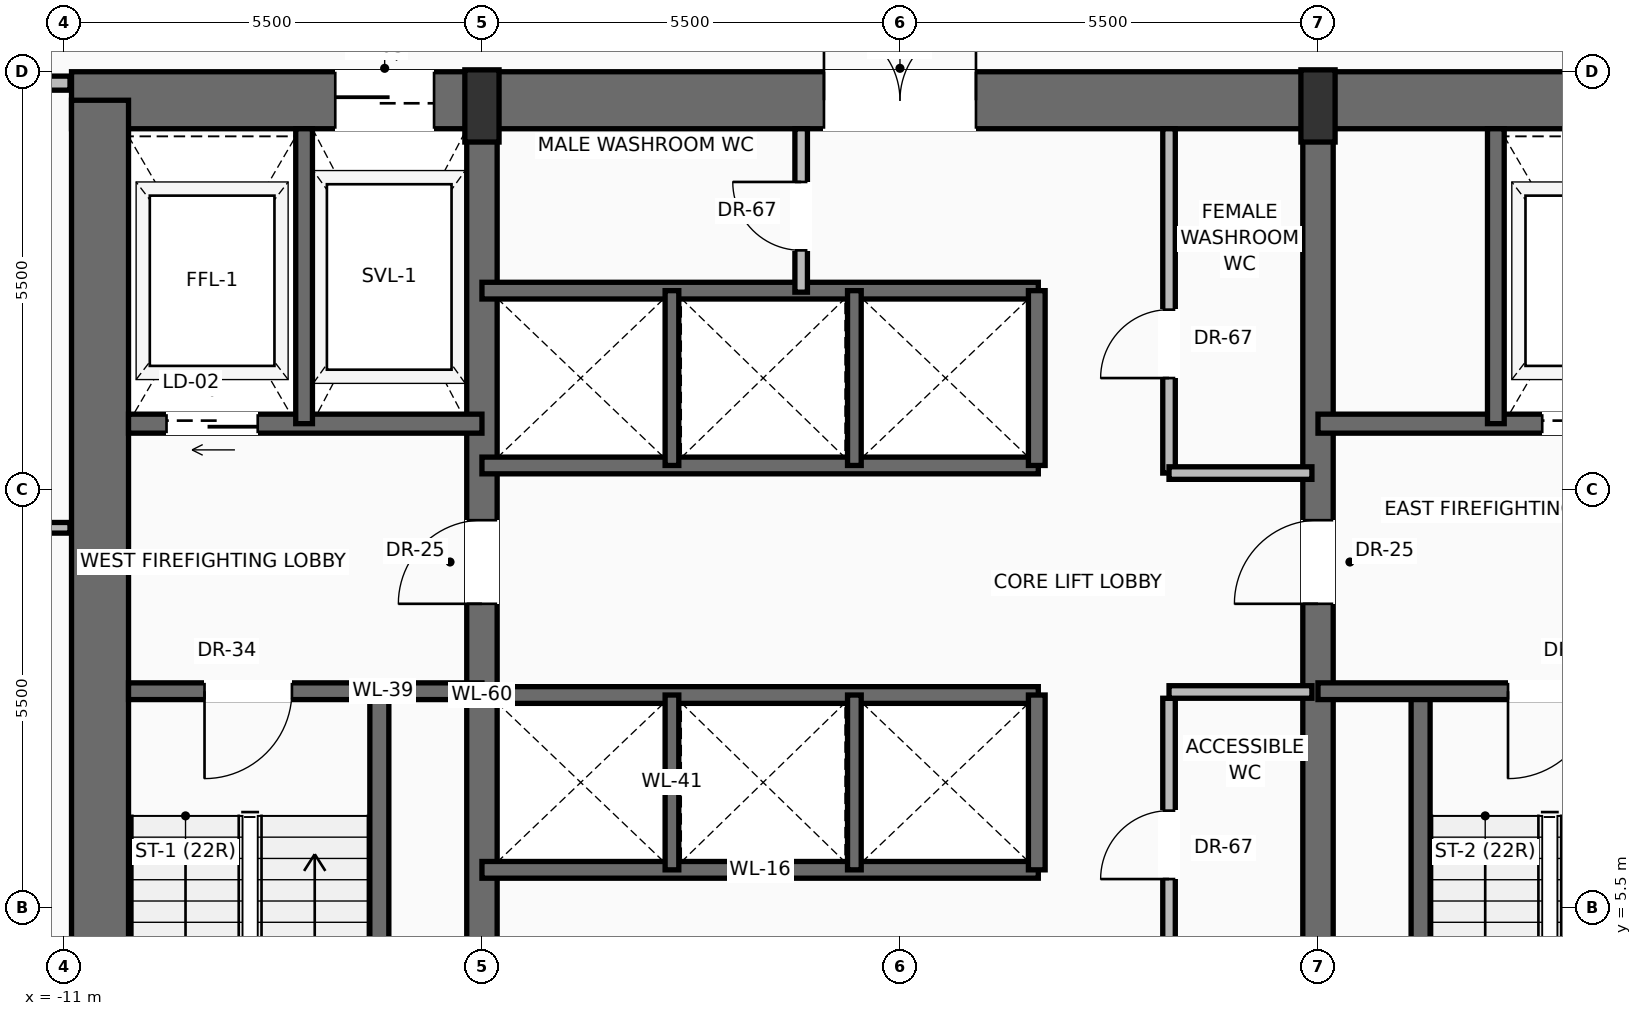
"""IFC4 building model, lengths in metres.
Left out: names, types, materials, properties, quantities, classifications, styles, units other than length and angle.
Written with IfcOpenShell. Run it as: python <this file> out.ifc"""

import sys

from ifc_helpers import new_model, si_unit, direction, frame, frame_2d, origin, origin_2d, place, context, subcontext, project, spatial, rectangle, extrude, source, transform, mapped, element, fill, save


model = new_model("IFC4")
c1 = context("Model", 3, precision=1e-05, world=origin(), true_north=direction((0.0, 1.0)))
c2 = subcontext(c1, "Body", "Model", "MODEL_VIEW")
j1 = project(units=[si_unit("LENGTHUNIT", "METRE"), si_unit("PLANEANGLEUNIT", "RADIAN")], contexts=[c1])
p1 = place(None, origin())
s1 = spatial("IfcSite", under=j1, at=p1, CompositionType="ELEMENT")
p2 = place(p1, origin())
s2 = spatial("IfcBuilding", under=s1, at=p2, CompositionType="ELEMENT")
p3 = place(p2, frame((0.0, 0.0, 87.7)))
s3 = spatial("IfcBuildingStorey", under=s2, at=p3, CompositionType="ELEMENT", Elevation=87.7)
p4 = place(p3, frame((-10.9, 16.125, 0.0), z_axis=(0.0, 0.0, 1.0), x_axis=(1.0, 0.0, 0.0)))
e1 = element("IfcWall", 1, at=p4, inside=s3, PredefinedType="SHEAR", context=c2, shape_type="SweptSolid", body=[
    extrude(rectangle(XDim=21.8, YDim=0.75, at=frame_2d((10.9, 0.0))), origin(), (0.0, 0.0, 1.0), 3.45),
])
p5 = place(p4, frame((3.47, 0.0, 0.0)))
e2 = element("IfcOpeningElement", 2, at=p5, cuts=e1, PredefinedType="OPENING", context=c2, shape_type="SweptSolid", body=[
    extrude(rectangle(XDim=1.3, YDim=2.3, at=frame_2d((0.65, 1.15))), frame((0.0, 0.385, 0.0), z_axis=(0.0, -1.0, 0.0), x_axis=(1.0, 0.0, 0.0)), (0.0, 0.0, 1.0), 0.77),
])
p6 = place(p4, frame((9.9, 0.0, 0.0)))
e3 = element("IfcOpeningElement", 3, at=p6, cuts=e1, PredefinedType="OPENING", context=c2, shape_type="SweptSolid", body=[
    extrude(rectangle(XDim=2.0, YDim=2.4, at=frame_2d((1.0, 1.2))), frame((0.0, 0.385, 0.0), z_axis=(0.0, -1.0, 0.0), x_axis=(1.0, 0.0, 0.0)), (0.0, 0.0, 1.0), 0.77),
])
p7 = place(p3, frame((-10.525, 0.475, 0.0), z_axis=(0.0, 0.0, 1.0), x_axis=(0.0, 1.0, 0.0)))
e4 = element("IfcWall", 4, at=p7, inside=s3, PredefinedType="SHEAR", context=c2, shape_type="SweptSolid", body=[
    extrude(rectangle(XDim=15.65, YDim=0.75, at=frame_2d((7.825, 0.0))), origin(), (0.0, 0.0, 1.0), 3.45),
])
p8 = place(p3, frame((-5.5, 0.475, 0.0), z_axis=(0.0, 0.0, 1.0), x_axis=(0.0, 1.0, 0.0)))
e5 = element("IfcWall", 5, at=p8, inside=s3, PredefinedType="SHEAR", context=c2, shape_type="SweptSolid", body=[
    extrude(rectangle(XDim=15.65, YDim=0.4, at=frame_2d((7.825, 0.0))), origin(), (0.0, 0.0, 1.0), 3.45),
])
p9 = place(p8, frame((9.025, 0.0, 0.0)))
e6 = element("IfcOpeningElement", 6, at=p9, cuts=e5, PredefinedType="OPENING", context=c2, shape_type="SweptSolid", body=[
    extrude(rectangle(XDim=1.1, YDim=2.2, at=frame_2d((0.55, 1.1))), frame((0.0, 0.21, 0.0), z_axis=(0.0, -1.0, 0.0), x_axis=(1.0, 0.0, 0.0)), (0.0, 0.0, 1.0), 0.42),
])
p10 = place(p3, frame((5.5, 0.475, 0.0), z_axis=(0.0, 0.0, 1.0), x_axis=(0.0, 1.0, 0.0)))
e7 = element("IfcWall", 7, at=p10, inside=s3, PredefinedType="SHEAR", context=c2, shape_type="SweptSolid", body=[
    extrude(rectangle(XDim=15.65, YDim=0.4, at=frame_2d((7.825, 0.0))), origin(), (0.0, 0.0, 1.0), 3.45),
])
p11 = place(p10, frame((9.025, 0.0, 0.0)))
e8 = element("IfcOpeningElement", 8, at=p11, cuts=e7, PredefinedType="OPENING", context=c2, shape_type="SweptSolid", body=[
    extrude(rectangle(XDim=1.1, YDim=2.2, at=frame_2d((0.55, 1.1))), frame((0.0, 0.21, 0.0), z_axis=(0.0, -1.0, 0.0), x_axis=(1.0, 0.0, 0.0)), (0.0, 0.0, 1.0), 0.42),
])
m1 = source(origin(), c2, "Body", "SweptSolid", [
    extrude(rectangle(XDim=0.45, YDim=0.95, at=origin_2d()), origin(), (0.0, 0.0, 1.0), 3.7),
])
for number, where, z_axis, x_axis in (
    (9, (-5.5, 16.05, 0.0), (0.0, 0.0, 1.0), (1.0, 0.0, 0.0)),
    (10, (5.5, 16.05, 0.0), (0.0, 0.0, 1.0), (1.0, 0.0, 0.0)),
):
    element("IfcColumn", number, at=place(p3, frame(where, z_axis=z_axis, x_axis=x_axis)), inside=s3, PredefinedType="PILASTER", context=c2, shape_type="MappedRepresentation", body=[
        mapped(m1, transform((0.0, 0.0, 0.0), scale=1.0)),
    ])
p12 = place(p3, frame((-6.85, 0.85, 0.0), z_axis=(0.0, 0.0, 1.0), x_axis=(0.0, 1.0, 0.0)))
e11 = element("IfcWall", 11, at=p12, inside=s3, PredefinedType="SOLIDWALL", context=c2, shape_type="SweptSolid", body=[
    extrude(rectangle(XDim=7.5, YDim=0.25, at=frame_2d((3.75, 0.0))), origin(), (0.0, 0.0, 1.0), 3.45),
])
p13 = place(p3, frame((-5.5, 8.35, 0.0), z_axis=(0.0, 0.0, 1.0), x_axis=(-1.0, 0.0, 0.0)))
e12 = element("IfcWall", 12, at=p13, inside=s3, PredefinedType="SOLIDWALL", context=c2, shape_type="SweptSolid", body=[
    extrude(rectangle(XDim=4.65, YDim=0.22, at=frame_2d((2.325, 0.0))), origin(), (0.0, 0.0, 1.0), 3.45),
])
p14 = place(p13, frame((2.5, 0.0, 0.0)))
e13 = element("IfcOpeningElement", 13, at=p14, cuts=e12, PredefinedType="OPENING", context=c2, shape_type="SweptSolid", body=[
    extrude(rectangle(XDim=1.15, YDim=2.2, at=frame_2d((0.575, 1.1))), frame((0.0, 0.12, 0.0), z_axis=(0.0, -1.0, 0.0), x_axis=(1.0, 0.0, 0.0)), (0.0, 0.0, 1.0), 0.24),
])
p15 = place(p3, frame((-5.5, 11.87, 0.0), z_axis=(0.0, 0.0, 1.0), x_axis=(-1.0, 0.0, 0.0)))
e14 = element("IfcWall", 14, at=p15, inside=s3, PredefinedType="SOLIDWALL", context=c2, shape_type="SweptSolid", body=[
    extrude(rectangle(XDim=4.65, YDim=0.25, at=frame_2d((2.325, 0.0))), origin(), (0.0, 0.0, 1.0), 3.45),
])
p16 = place(p15, frame((2.95, 0.0, 0.0)))
e15 = element("IfcOpeningElement", 15, at=p16, cuts=e14, PredefinedType="OPENING", context=c2, shape_type="SweptSolid", body=[
    extrude(rectangle(XDim=1.2, YDim=2.25, at=frame_2d((0.6, 1.125))), frame((0.0, 0.135, 0.0), z_axis=(0.0, -1.0, 0.0), x_axis=(1.0, 0.0, 0.0)), (0.0, 0.0, 1.0), 0.27),
])
p17 = place(p3, frame((-7.84, 11.87, 0.0), z_axis=(0.0, 0.0, 1.0), x_axis=(0.0, 1.0, 0.0)))
e16 = element("IfcWall", 16, at=p17, inside=s3, PredefinedType="SOLIDWALL", context=c2, shape_type="SweptSolid", body=[
    extrude(rectangle(XDim=3.88, YDim=0.22, at=frame_2d((1.94, 0.0))), origin(), (0.0, 0.0, 1.0), 3.45),
])
p18 = place(p3, frame((6.85, 0.85, 0.0), z_axis=(0.0, 0.0, 1.0), x_axis=(0.0, 1.0, 0.0)))
e17 = element("IfcWall", 17, at=p18, inside=s3, PredefinedType="SOLIDWALL", context=c2, shape_type="SweptSolid", body=[
    extrude(rectangle(XDim=7.5, YDim=0.25, at=frame_2d((3.75, 0.0))), origin(), (0.0, 0.0, 1.0), 3.45),
])
p19 = place(p3, frame((10.15, 8.35, 0.0), z_axis=(0.0, 0.0, 1.0), x_axis=(-1.0, 0.0, 0.0)))
e18 = element("IfcWall", 18, at=p19, inside=s3, PredefinedType="SOLIDWALL", context=c2, shape_type="SweptSolid", body=[
    extrude(rectangle(XDim=4.65, YDim=0.22, at=frame_2d((2.325, 0.0))), origin(), (0.0, 0.0, 1.0), 3.45),
])
p20 = place(p19, frame((1.0, 0.0, 0.0)))
e19 = element("IfcOpeningElement", 19, at=p20, cuts=e18, PredefinedType="OPENING", context=c2, shape_type="SweptSolid", body=[
    extrude(rectangle(XDim=1.15, YDim=2.2, at=frame_2d((0.575, 1.1))), frame((0.0, 0.12, 0.0), z_axis=(0.0, -1.0, 0.0), x_axis=(1.0, 0.0, 0.0)), (0.0, 0.0, 1.0), 0.24),
])
p21 = place(p3, frame((10.15, 11.87, 0.0), z_axis=(0.0, 0.0, 1.0), x_axis=(-1.0, 0.0, 0.0)))
e20 = element("IfcWall", 20, at=p21, inside=s3, PredefinedType="SOLIDWALL", context=c2, shape_type="SweptSolid", body=[
    extrude(rectangle(XDim=4.65, YDim=0.25, at=frame_2d((2.325, 0.0))), origin(), (0.0, 0.0, 1.0), 3.45),
])
p22 = place(p21, frame((0.5, 0.0, 0.0)))
e21 = element("IfcOpeningElement", 21, at=p22, cuts=e20, PredefinedType="OPENING", context=c2, shape_type="SweptSolid", body=[
    extrude(rectangle(XDim=1.2, YDim=2.25, at=frame_2d((0.6, 1.125))), frame((0.0, 0.135, 0.0), z_axis=(0.0, -1.0, 0.0), x_axis=(1.0, 0.0, 0.0)), (0.0, 0.0, 1.0), 0.27),
])
p23 = place(p3, frame((7.84, 11.87, 0.0), z_axis=(0.0, 0.0, 1.0), x_axis=(0.0, 1.0, 0.0)))
e22 = element("IfcWall", 22, at=p23, inside=s3, PredefinedType="SOLIDWALL", context=c2, shape_type="SweptSolid", body=[
    extrude(rectangle(XDim=3.88, YDim=0.22, at=frame_2d((1.94, 0.0))), origin(), (0.0, 0.0, 1.0), 3.45),
])
p24 = place(p3, frame((3.54, 3.933, 0.0), z_axis=(0.0, 0.0, 1.0), x_axis=(0.0, 1.0, 0.0)))
e23 = element("IfcWall", 23, at=p24, inside=s3, PredefinedType="PARTITIONING", context=c2, shape_type="SweptSolid", body=[
    extrude(rectangle(XDim=4.325, YDim=0.165, at=frame_2d((2.163, 0.0))), origin(), (0.0, 0.0, 1.0), 3.442),
])
p25 = place(p24, frame((1.946, 0.0, 0.0)))
e24 = element("IfcOpeningElement", 24, at=p25, cuts=e23, PredefinedType="OPENING", context=c2, shape_type="SweptSolid", body=[
    extrude(rectangle(XDim=0.9, YDim=2.1, at=frame_2d((0.45, 1.05))), frame((0.0, 0.093, 0.0), z_axis=(0.0, -1.0, 0.0), x_axis=(1.0, 0.0, 0.0)), (0.0, 0.0, 1.0), 0.185),
])
p26 = place(p3, frame((3.54, 8.34, 0.0), z_axis=(0.0, 0.0, 1.0), x_axis=(1.0, 0.0, 0.0)))
e25 = element("IfcWall", 25, at=p26, inside=s3, PredefinedType="PARTITIONING", context=c2, shape_type="SweptSolid", body=[
    extrude(rectangle(XDim=1.88, YDim=0.165, at=frame_2d((0.94, 0.0))), origin(), (0.0, 0.0, 1.0), 3.442),
])
for number, where, z_axis, x_axis in (
    (26, (-5.5, 6.0, 0.0), (0.0, 0.0, 1.0), (1.0, 0.0, 0.0)),
    (27, (-5.5, 8.3, 0.0), (0.0, 0.0, 1.0), (1.0, 0.0, 0.0)),
):
    element("IfcWall", number, at=place(p3, frame(where, z_axis=z_axis, x_axis=x_axis)), inside=s3, PredefinedType="SOLIDWALL", context=c2, shape_type="SweptSolid", body=[
        extrude(rectangle(XDim=7.32, YDim=0.22, at=frame_2d((3.66, 0.0))), origin(), (0.0, 0.0, 1.0), 3.45),
    ])
p27 = place(p3, frame((1.8, 6.0, 0.0), z_axis=(0.0, 0.0, 1.0), x_axis=(0.0, 1.0, 0.0)))
e28 = element("IfcWall", 28, at=p27, inside=s3, PredefinedType="SOLIDWALL", context=c2, shape_type="SweptSolid", body=[
    extrude(rectangle(XDim=2.3, YDim=0.22, at=frame_2d((1.15, 0.0))), origin(), (0.0, 0.0, 1.0), 3.45),
])
for number, where, z_axis, x_axis in (
    (29, (-3.0, 6.0, 0.0), (0.0, 0.0, 1.0), (0.0, 1.0, 0.0)),
    (30, (-0.6, 6.0, 0.0), (0.0, 0.0, 1.0), (0.0, 1.0, 0.0)),
):
    element("IfcWall", number, at=place(p3, frame(where, z_axis=z_axis, x_axis=x_axis)), inside=s3, PredefinedType="SOLIDWALL", context=c2, shape_type="SweptSolid", body=[
        extrude(rectangle(XDim=2.3, YDim=0.18, at=frame_2d((1.15, 0.0))), origin(), (0.0, 0.0, 1.0), 3.45),
    ])
for number, where, z_axis, x_axis in (
    (31, (-5.5, 11.32, 0.0), (0.0, 0.0, 1.0), (1.0, 0.0, 0.0)),
    (32, (-5.5, 13.62, 0.0), (0.0, 0.0, 1.0), (1.0, 0.0, 0.0)),
):
    element("IfcWall", number, at=place(p3, frame(where, z_axis=z_axis, x_axis=x_axis)), inside=s3, PredefinedType="SOLIDWALL", context=c2, shape_type="SweptSolid", body=[
        extrude(rectangle(XDim=7.32, YDim=0.22, at=frame_2d((3.66, 0.0))), origin(), (0.0, 0.0, 1.0), 3.45),
    ])
p28 = place(p3, frame((1.8, 11.32, 0.0), z_axis=(0.0, 0.0, 1.0), x_axis=(0.0, 1.0, 0.0)))
e33 = element("IfcWall", 33, at=p28, inside=s3, PredefinedType="SOLIDWALL", context=c2, shape_type="SweptSolid", body=[
    extrude(rectangle(XDim=2.3, YDim=0.22, at=frame_2d((1.15, 0.0))), origin(), (0.0, 0.0, 1.0), 3.45),
])
for number, where, z_axis, x_axis in (
    (34, (-3.0, 11.32, 0.0), (0.0, 0.0, 1.0), (0.0, 1.0, 0.0)),
    (35, (-0.6, 11.32, 0.0), (0.0, 0.0, 1.0), (0.0, 1.0, 0.0)),
):
    element("IfcWall", number, at=place(p3, frame(where, z_axis=z_axis, x_axis=x_axis)), inside=s3, PredefinedType="SOLIDWALL", context=c2, shape_type="SweptSolid", body=[
        extrude(rectangle(XDim=2.3, YDim=0.18, at=frame_2d((1.15, 0.0))), origin(), (0.0, 0.0, 1.0), 3.45),
    ])
p29 = place(p3, frame((-1.3, 13.6, 0.0), z_axis=(0.0, 0.0, 1.0), x_axis=(0.0, 1.0, 0.0)))
e36 = element("IfcWall", 36, at=p29, inside=s3, PredefinedType="PARTITIONING", context=c2, shape_type="SweptSolid", body=[
    extrude(rectangle(XDim=2.15, YDim=0.165, at=frame_2d((1.075, 0.0))), origin(), (0.0, 0.0, 1.0), 3.442),
])
p30 = place(p29, frame((0.55, 0.0, 0.0)))
e37 = element("IfcOpeningElement", 37, at=p30, cuts=e36, PredefinedType="OPENING", context=c2, shape_type="SweptSolid", body=[
    extrude(rectangle(XDim=0.9, YDim=2.1, at=frame_2d((0.45, 1.05))), frame((0.0, 0.093, 0.0), z_axis=(0.0, -1.0, 0.0), x_axis=(1.0, 0.0, 0.0)), (0.0, 0.0, 1.0), 0.185),
])
p31 = place(p3, frame((3.54, 11.22, 0.0), z_axis=(0.0, 0.0, 1.0), x_axis=(0.0, 1.0, 0.0)))
e38 = element("IfcWall", 38, at=p31, inside=s3, PredefinedType="PARTITIONING", context=c2, shape_type="SweptSolid", body=[
    extrude(rectangle(XDim=4.53, YDim=0.165, at=frame_2d((2.265, 0.0))), origin(), (0.0, 0.0, 1.0), 3.442),
])
p32 = place(p31, frame((1.25, 0.0, 0.0)))
e39 = element("IfcOpeningElement", 39, at=p32, cuts=e38, PredefinedType="OPENING", context=c2, shape_type="SweptSolid", body=[
    extrude(rectangle(XDim=0.9, YDim=2.1, at=frame_2d((0.45, 1.05))), frame((0.0, 0.093, 0.0), z_axis=(0.0, -1.0, 0.0), x_axis=(1.0, 0.0, 0.0)), (0.0, 0.0, 1.0), 0.185),
])
p33 = place(p3, frame((3.54, 11.22, 0.0), z_axis=(0.0, 0.0, 1.0), x_axis=(1.0, 0.0, 0.0)))
e40 = element("IfcWall", 40, at=p33, inside=s3, PredefinedType="PARTITIONING", context=c2, shape_type="SweptSolid", body=[
    extrude(rectangle(XDim=1.88, YDim=0.165, at=frame_2d((0.94, 0.0))), origin(), (0.0, 0.0, 1.0), 3.442),
])
p34 = place(p3, frame((-23.229, 16.35, 0.0), z_axis=(0.0, 0.0, 1.0), x_axis=(1.0, 0.0, 0.0)))
e41 = element("IfcWall", 41, at=p34, inside=s3, PredefinedType="PARTITIONING", context=c2, shape_type="SweptSolid", body=[
    extrude(rectangle(XDim=12.31, YDim=0.185, at=frame_2d((6.155, 0.0))), origin(), (0.0, 0.0, 1.0), 2.747),
])
p35 = place(p34, frame((5.098, 0.0, 0.0)))
e42 = element("IfcOpeningElement", 42, at=p35, cuts=e41, PredefinedType="OPENING", context=c2, shape_type="SweptSolid", body=[
    extrude(rectangle(XDim=0.95, YDim=2.2, at=frame_2d((0.475, 1.1))), frame((0.0, 0.103, 0.0), z_axis=(0.0, -1.0, 0.0), x_axis=(1.0, 0.0, 0.0)), (0.0, 0.0, 1.0), 0.205),
])
p36 = place(p3, frame((-27.177, 10.5, 0.0), z_axis=(0.0, 0.0, 1.0), x_axis=(1.0, 0.0, 0.0)))
e43 = element("IfcWall", 43, at=p36, inside=s3, PredefinedType="PARTITIONING", context=c2, shape_type="SweptSolid", body=[
    extrude(rectangle(XDim=16.257, YDim=0.14, at=frame_2d((8.128, 0.0))), origin(), (0.0, 0.0, 1.0), 3.442),
])
p37 = place(p36, frame((7.666, 0.0, 0.0)))
e44 = element("IfcOpeningElement", 44, at=p37, cuts=e43, PredefinedType="OPENING", context=c2, shape_type="SweptSolid", body=[
    extrude(rectangle(XDim=0.95, YDim=2.2, at=frame_2d((0.475, 1.1))), frame((0.0, 0.08, 0.0), z_axis=(0.0, -1.0, 0.0), x_axis=(1.0, 0.0, 0.0)), (0.0, 0.0, 1.0), 0.16),
])
m2 = source(origin(), c2, "Body", "SweptSolid", [
    extrude(rectangle(XDim=1.15, YDim=2.2, at=frame_2d((0.575, 1.1))), frame((0.0, 0.025, 0.0), z_axis=(0.0, -1.0, 0.0), x_axis=(1.0, 0.0, 0.0)), (0.0, 0.0, 1.0), 0.05),
])
p38 = place(p14, origin())
e45 = element("IfcDoor", 45, at=p38, inside=s3, OperationType="SINGLE_SWING_RIGHT", PredefinedType="DOOR", context=c2, shape_type="MappedRepresentation", body=[
    mapped(m2, transform((0.0, 0.0, 0.0), scale=1.0)),
])
fill(e13, e45)
m3 = source(origin(), c2, "Body", "SweptSolid", [
    extrude(rectangle(XDim=1.1, YDim=2.2, at=frame_2d((0.55, 1.1))), frame((0.0, 0.025, 0.0), z_axis=(0.0, -1.0, 0.0), x_axis=(1.0, 0.0, 0.0)), (0.0, 0.0, 1.0), 0.05),
])
p39 = place(p9, origin())
e46 = element("IfcDoor", 46, at=p39, inside=s3, OperationType="SINGLE_SWING_LEFT", PredefinedType="DOOR", context=c2, shape_type="MappedRepresentation", body=[
    mapped(m3, transform((0.0, 0.0, 0.0), scale=1.0)),
])
fill(e6, e46)
m4 = source(origin(), c2, "Body", "SweptSolid", [
    extrude(rectangle(XDim=1.2, YDim=2.25, at=frame_2d((0.6, 1.125))), frame((0.0, 0.025, 0.0), z_axis=(0.0, -1.0, 0.0), x_axis=(1.0, 0.0, 0.0)), (0.0, 0.0, 1.0), 0.05),
])
p40 = place(p16, origin())
e47 = element("IfcDoor", 47, at=p40, inside=s3, OperationType="SLIDING_TO_LEFT", PredefinedType="DOOR", context=c2, shape_type="MappedRepresentation", body=[
    mapped(m4, transform((0.0, 0.0, 0.0), scale=1.0)),
])
fill(e15, e47)
m5 = source(origin(), c2, "Body", "SweptSolid", [
    extrude(rectangle(XDim=1.3, YDim=2.3, at=frame_2d((0.65, 1.15))), frame((0.0, 0.025, 0.0), z_axis=(0.0, -1.0, 0.0), x_axis=(1.0, 0.0, 0.0)), (0.0, 0.0, 1.0), 0.05),
])
p41 = place(p5, origin())
e48 = element("IfcDoor", 48, at=p41, inside=s3, OperationType="SLIDING_TO_RIGHT", PredefinedType="DOOR", context=c2, shape_type="MappedRepresentation", body=[
    mapped(m5, transform((0.0, 0.0, 0.0), scale=1.0)),
])
fill(e2, e48)
p42 = place(p20, origin())
e49 = element("IfcDoor", 49, at=p42, inside=s3, OperationType="SINGLE_SWING_RIGHT", PredefinedType="DOOR", context=c2, shape_type="MappedRepresentation", body=[
    mapped(m2, transform((0.0, 0.0, 0.0), scale=1.0)),
])
fill(e19, e49)
p43 = place(p11, origin())
e50 = element("IfcDoor", 50, at=p43, inside=s3, OperationType="SINGLE_SWING_LEFT", PredefinedType="DOOR", context=c2, shape_type="MappedRepresentation", body=[
    mapped(m3, transform((0.0, 0.0, 0.0), scale=1.0)),
])
fill(e8, e50)
p44 = place(p22, origin())
e51 = element("IfcDoor", 51, at=p44, inside=s3, OperationType="SLIDING_TO_RIGHT", PredefinedType="DOOR", context=c2, shape_type="MappedRepresentation", body=[
    mapped(m4, transform((0.0, 0.0, 0.0), scale=1.0)),
])
fill(e21, e51)
m6 = source(origin(), c2, "Body", "SweptSolid", [
    extrude(rectangle(XDim=2.0, YDim=2.4, at=frame_2d((1.0, 1.2))), frame((0.0, 0.025, 0.0), z_axis=(0.0, -1.0, 0.0), x_axis=(1.0, 0.0, 0.0)), (0.0, 0.0, 1.0), 0.05),
])
p45 = place(p6, origin())
e52 = element("IfcDoor", 52, at=p45, inside=s3, OperationType="DOUBLE_DOOR_SINGLE_SWING", PredefinedType="DOOR", context=c2, shape_type="MappedRepresentation", body=[
    mapped(m6, transform((0.0, 0.0, 0.0), scale=1.0)),
])
fill(e3, e52)
m7 = source(origin(), c2, "Body", "SweptSolid", [
    extrude(rectangle(XDim=0.9, YDim=2.1, at=frame_2d((0.45, 1.05))), frame((0.0, 0.025, 0.0), z_axis=(0.0, -1.0, 0.0), x_axis=(1.0, 0.0, 0.0)), (0.0, 0.0, 1.0), 0.05),
])
p46 = place(p25, origin())
e53 = element("IfcDoor", 53, at=p46, inside=s3, OperationType="SINGLE_SWING_LEFT", PredefinedType="DOOR", context=c2, shape_type="MappedRepresentation", body=[
    mapped(m7, transform((0.0, 0.0, 0.0), scale=1.0)),
])
fill(e24, e53)
p47 = place(p30, origin())
e54 = element("IfcDoor", 54, at=p47, inside=s3, OperationType="SINGLE_SWING_RIGHT", PredefinedType="DOOR", context=c2, shape_type="MappedRepresentation", body=[
    mapped(m7, transform((0.0, 0.0, 0.0), scale=1.0)),
])
fill(e37, e54)
p48 = place(p32, origin())
e55 = element("IfcDoor", 55, at=p48, inside=s3, OperationType="SINGLE_SWING_LEFT", PredefinedType="DOOR", context=c2, shape_type="MappedRepresentation", body=[
    mapped(m7, transform((0.0, 0.0, 0.0), scale=1.0)),
])
fill(e39, e55)
save(model, sys.argv[1])
